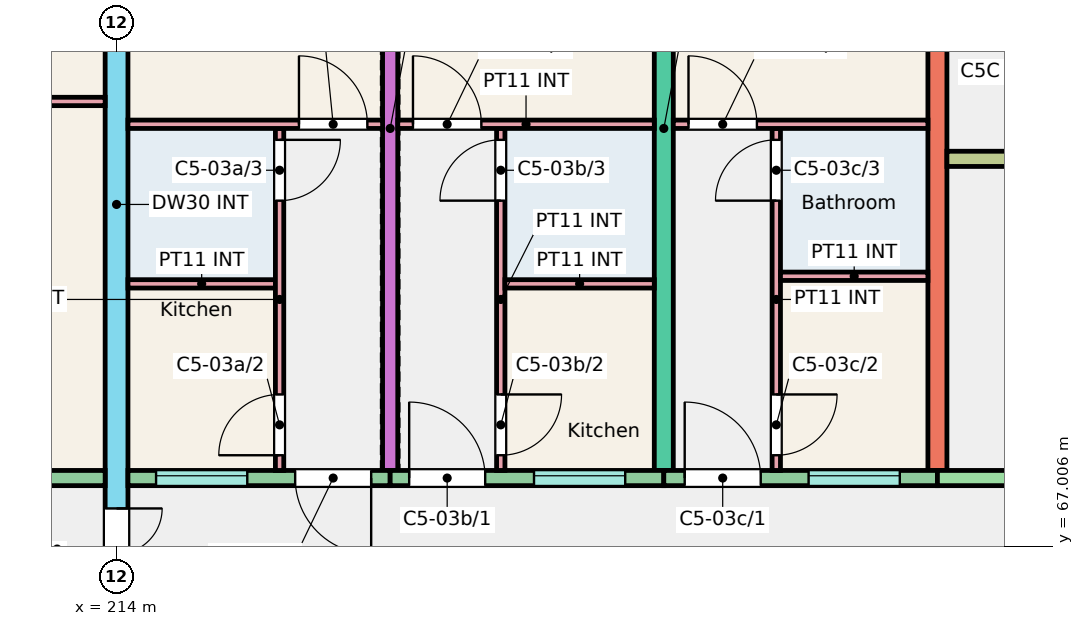
"""IFC4 building model, lengths in metres.
Left out: names, types, materials, properties, quantities, classifications, styles, units other than length and angle.
Written with IfcOpenShell. Run it as: python <this file> out.ifc"""

import sys

from ifc_helpers import new_model, si_unit, direction, frame, frame_2d, origin, place, context, subcontext, project, spatial, rectangle, extrude, element, fill, save


model = new_model("IFC4")
c1 = context("Model", 3, precision=1e-05, world=origin(), true_north=direction((0.0, 1.0)))
c2 = subcontext(c1, "Body", "Model", "MODEL_VIEW")
j1 = project(units=[si_unit("LENGTHUNIT", "METRE"), si_unit("PLANEANGLEUNIT", "RADIAN")], contexts=[c1])
p1 = place(None, origin())
s1 = spatial("IfcSite", under=j1, at=p1, CompositionType="ELEMENT")
p2 = place(p1, origin())
s2 = spatial("IfcBuilding", under=s1, at=p2, CompositionType="ELEMENT")
p3 = place(p2, frame((0.0, 0.0, 9.0)))
s3 = spatial("IfcBuildingStorey", under=s2, at=p3, CompositionType="ELEMENT", Elevation=9.0)
p4 = place(p3, frame((214.0, 66.0, 0.0), z_axis=(0.0, 0.0, 1.0), x_axis=(0.0, 1.0, 0.0)))
e1 = element("IfcWall", 1, at=p4, inside=s3, PredefinedType="SHEAR", context=c2, shape_type="SweptSolid", body=[
    extrude(rectangle(XDim=11.0, YDim=0.3, at=frame_2d((5.5, 0.0))), origin(), (0.0, 0.0, 1.0), 3.0),
])
p5 = place(p4, frame((0.3, 0.0, 0.0)))
e2 = element("IfcOpeningElement", 2, at=p5, cuts=e1, PredefinedType="OPENING", context=c2, shape_type="SweptSolid", body=[
    extrude(rectangle(XDim=1.2, YDim=2.1, at=frame_2d((0.6, 1.05))), frame((0.0, 0.16, 0.0), z_axis=(0.0, -1.0, 0.0), x_axis=(1.0, 0.0, 0.0)), (0.0, 0.0, 1.0), 0.32),
])
p6 = place(p3, frame((217.6, 68.0, 0.0), z_axis=(0.0, 0.0, 1.0), x_axis=(0.0, 1.0, 0.0)))
e3 = element("IfcWall", 3, at=p6, inside=s3, PredefinedType="SHEAR", context=c2, shape_type="SweptSolid", body=[
    extrude(rectangle(XDim=9.0, YDim=0.2, at=frame_2d((4.5, 0.0))), origin(), (0.0, 0.0, 1.0), 3.0),
])
for number, where, z_axis, x_axis in (
    (4, (221.2, 68.0, 0.0), (0.0, 0.0, 1.0), (0.0, 1.0, 0.0)),
    (5, (224.8, 68.0, 0.0), (0.0, 0.0, 1.0), (0.0, 1.0, 0.0)),
):
    element("IfcWall", number, at=place(p3, frame(where, z_axis=z_axis, x_axis=x_axis)), inside=s3, PredefinedType="SHEAR", context=c2, shape_type="SweptSolid", body=[
        extrude(rectangle(XDim=9.0, YDim=0.25, at=frame_2d((4.5, 0.0))), origin(), (0.0, 0.0, 1.0), 3.0),
    ])
p7 = place(p3, frame((210.4, 67.9, 0.0), z_axis=(0.0, 0.0, 1.0), x_axis=(1.0, 0.0, 0.0)))
e6 = element("IfcWall", 6, at=p7, inside=s3, PredefinedType="SOLIDWALL", context=c2, shape_type="SweptSolid", body=[
    extrude(rectangle(XDim=3.45, YDim=0.2, at=frame_2d((1.725, 0.0))), origin(), (0.0, 0.0, 1.0), 3.0),
])
p8 = place(p7, frame((1.025, 0.0, 0.9)))
e7 = element("IfcOpeningElement", 7, at=p8, cuts=e6, PredefinedType="OPENING", context=c2, shape_type="SweptSolid", body=[
    extrude(rectangle(XDim=1.5, YDim=1.5, at=frame_2d((0.75, 0.75))), frame((0.0, 0.11, 0.0), z_axis=(0.0, -1.0, 0.0), x_axis=(1.0, 0.0, 0.0)), (0.0, 0.0, 1.0), 0.22),
])
p9 = place(p3, frame((214.15, 67.9, 0.0), z_axis=(0.0, 0.0, 1.0), x_axis=(1.0, 0.0, 0.0)))
e8 = element("IfcWall", 8, at=p9, inside=s3, PredefinedType="SOLIDWALL", context=c2, shape_type="SweptSolid", body=[
    extrude(rectangle(XDim=3.45, YDim=0.2, at=frame_2d((1.725, 0.0))), origin(), (0.0, 0.0, 1.0), 3.0),
])
p10 = place(p9, frame((0.37, 0.0, 1.1)))
e9 = element("IfcOpeningElement", 9, at=p10, cuts=e8, PredefinedType="OPENING", context=c2, shape_type="SweptSolid", body=[
    extrude(rectangle(XDim=1.2, YDim=1.3, at=frame_2d((0.6, 0.65))), frame((0.0, 0.11, 0.0), z_axis=(0.0, -1.0, 0.0), x_axis=(1.0, 0.0, 0.0)), (0.0, 0.0, 1.0), 0.22),
])
p11 = place(p9, frame((2.2, 0.0, 0.0)))
e10 = element("IfcOpeningElement", 10, at=p11, cuts=e8, PredefinedType="OPENING", context=c2, shape_type="SweptSolid", body=[
    extrude(rectangle(XDim=1.0, YDim=2.1, at=frame_2d((0.5, 1.05))), frame((0.0, 0.11, 0.0), z_axis=(0.0, -1.0, 0.0), x_axis=(1.0, 0.0, 0.0)), (0.0, 0.0, 1.0), 0.22),
])
p12 = place(p3, frame((217.6, 67.9, 0.0), z_axis=(0.0, 0.0, 1.0), x_axis=(1.0, 0.0, 0.0)))
e11 = element("IfcWall", 11, at=p12, inside=s3, PredefinedType="SOLIDWALL", context=c2, shape_type="SweptSolid", body=[
    extrude(rectangle(XDim=3.6, YDim=0.2, at=frame_2d((1.8, 0.0))), origin(), (0.0, 0.0, 1.0), 3.0),
])
p13 = place(p12, frame((1.893, 0.0, 1.1)))
e12 = element("IfcOpeningElement", 12, at=p13, cuts=e11, PredefinedType="OPENING", context=c2, shape_type="SweptSolid", body=[
    extrude(rectangle(XDim=1.2, YDim=1.3, at=frame_2d((0.6, 0.65))), frame((0.0, 0.11, 0.0), z_axis=(0.0, -1.0, 0.0), x_axis=(1.0, 0.0, 0.0)), (0.0, 0.0, 1.0), 0.22),
])
p14 = place(p12, frame((0.25, 0.0, 0.0)))
e13 = element("IfcOpeningElement", 13, at=p14, cuts=e11, PredefinedType="OPENING", context=c2, shape_type="SweptSolid", body=[
    extrude(rectangle(XDim=1.0, YDim=2.1, at=frame_2d((0.5, 1.05))), frame((0.0, 0.11, 0.0), z_axis=(0.0, -1.0, 0.0), x_axis=(1.0, 0.0, 0.0)), (0.0, 0.0, 1.0), 0.22),
])
p15 = place(p3, frame((221.2, 67.9, 0.0), z_axis=(0.0, 0.0, 1.0), x_axis=(1.0, 0.0, 0.0)))
e14 = element("IfcWall", 14, at=p15, inside=s3, PredefinedType="SOLIDWALL", context=c2, shape_type="SweptSolid", body=[
    extrude(rectangle(XDim=3.6, YDim=0.2, at=frame_2d((1.8, 0.0))), origin(), (0.0, 0.0, 1.0), 3.0),
])
p16 = place(p15, frame((1.905, 0.0, 1.1)))
e15 = element("IfcOpeningElement", 15, at=p16, cuts=e14, PredefinedType="OPENING", context=c2, shape_type="SweptSolid", body=[
    extrude(rectangle(XDim=1.2, YDim=1.3, at=frame_2d((0.6, 0.65))), frame((0.0, 0.11, 0.0), z_axis=(0.0, -1.0, 0.0), x_axis=(1.0, 0.0, 0.0)), (0.0, 0.0, 1.0), 0.22),
])
p17 = place(p15, frame((0.275, 0.0, 0.0)))
e16 = element("IfcOpeningElement", 16, at=p17, cuts=e14, PredefinedType="OPENING", context=c2, shape_type="SweptSolid", body=[
    extrude(rectangle(XDim=1.0, YDim=2.1, at=frame_2d((0.5, 1.05))), frame((0.0, 0.11, 0.0), z_axis=(0.0, -1.0, 0.0), x_axis=(1.0, 0.0, 0.0)), (0.0, 0.0, 1.0), 0.22),
])
p18 = place(p3, frame((224.8, 67.9, 0.0), z_axis=(0.0, 0.0, 1.0), x_axis=(1.0, 0.0, 0.0)))
e17 = element("IfcWall", 17, at=p18, inside=s3, PredefinedType="SHEAR", context=c2, shape_type="SweptSolid", body=[
    extrude(rectangle(XDim=5.85, YDim=0.2, at=frame_2d((2.925, 0.0))), origin(), (0.0, 0.0, 1.0), 3.0),
])
p19 = place(p18, frame((2.438, 0.0, 0.0)))
e18 = element("IfcOpeningElement", 18, at=p19, cuts=e17, PredefinedType="OPENING", context=c2, shape_type="SweptSolid", body=[
    extrude(rectangle(XDim=1.1, YDim=2.1, at=frame_2d((0.55, 1.05))), frame((0.0, 0.11, 0.0), z_axis=(0.0, -1.0, 0.0), x_axis=(1.0, 0.0, 0.0)), (0.0, 0.0, 1.0), 0.22),
])
p20 = place(p3, frame((224.925, 72.1, 0.0), z_axis=(0.0, 0.0, 1.0), x_axis=(1.0, 0.0, 0.0)))
e19 = element("IfcWall", 19, at=p20, inside=s3, PredefinedType="SHEAR", context=c2, shape_type="SweptSolid", body=[
    extrude(rectangle(XDim=5.725, YDim=0.2, at=frame_2d((2.862, 0.0))), origin(), (0.0, 0.0, 1.0), 3.0),
])
p21 = place(p20, frame((0.95, 0.0, 0.0)))
e20 = element("IfcOpeningElement", 20, at=p21, cuts=e19, PredefinedType="OPENING", context=c2, shape_type="SweptSolid", body=[
    extrude(rectangle(XDim=1.0, YDim=2.1, at=frame_2d((0.5, 1.05))), frame((0.0, 0.11, 0.0), z_axis=(0.0, -1.0, 0.0), x_axis=(1.0, 0.0, 0.0)), (0.0, 0.0, 1.0), 0.22),
])
p22 = place(p20, frame((3.863, 0.0, 0.0)))
e21 = element("IfcOpeningElement", 21, at=p22, cuts=e19, PredefinedType="OPENING", context=c2, shape_type="SweptSolid", body=[
    extrude(rectangle(XDim=1.1, YDim=2.1, at=frame_2d((0.55, 1.05))), frame((0.0, 0.11, 0.0), z_axis=(0.0, -1.0, 0.0), x_axis=(1.0, 0.0, 0.0)), (0.0, 0.0, 1.0), 0.22),
])
p23 = place(p3, frame((210.5, 72.855, 0.0), z_axis=(0.0, 0.0, 1.0), x_axis=(1.0, 0.0, 0.0)))
e22 = element("IfcWall", 22, at=p23, inside=s3, PredefinedType="PARTITIONING", context=c2, shape_type="SweptSolid", body=[
    extrude(rectangle(XDim=3.35, YDim=0.11, at=frame_2d((1.675, 0.0))), origin(), (0.0, 0.0, 1.0), 2.8),
])
p24 = place(p3, frame((214.15, 70.455, 0.0), z_axis=(0.0, 0.0, 1.0), x_axis=(1.0, 0.0, 0.0)))
e23 = element("IfcWall", 23, at=p24, inside=s3, PredefinedType="PARTITIONING", context=c2, shape_type="SweptSolid", body=[
    extrude(rectangle(XDim=1.94, YDim=0.11, at=frame_2d((0.97, 0.0))), origin(), (0.0, 0.0, 1.0), 2.8),
])
p25 = place(p3, frame((216.145, 68.0, 0.0), z_axis=(0.0, 0.0, 1.0), x_axis=(0.0, 1.0, 0.0)))
e24 = element("IfcWall", 24, at=p25, inside=s3, PredefinedType="PARTITIONING", context=c2, shape_type="SweptSolid", body=[
    extrude(rectangle(XDim=4.5, YDim=0.11, at=frame_2d((2.25, 0.0))), origin(), (0.0, 0.0, 1.0), 2.8),
])
p26 = place(p25, frame((0.2, 0.0, 0.0)))
e25 = element("IfcOpeningElement", 25, at=p26, cuts=e24, PredefinedType="OPENING", context=c2, shape_type="SweptSolid", body=[
    extrude(rectangle(XDim=0.8, YDim=2.1, at=frame_2d((0.4, 1.05))), frame((0.0, 0.065, 0.0), z_axis=(0.0, -1.0, 0.0), x_axis=(1.0, 0.0, 0.0)), (0.0, 0.0, 1.0), 0.13),
])
p27 = place(p25, frame((3.55, 0.0, 0.0)))
e26 = element("IfcOpeningElement", 26, at=p27, cuts=e24, PredefinedType="OPENING", context=c2, shape_type="SweptSolid", body=[
    extrude(rectangle(XDim=0.8, YDim=2.1, at=frame_2d((0.4, 1.05))), frame((0.0, 0.065, 0.0), z_axis=(0.0, -1.0, 0.0), x_axis=(1.0, 0.0, 0.0)), (0.0, 0.0, 1.0), 0.13),
])
p28 = place(p3, frame((214.15, 72.555, 0.0), z_axis=(0.0, 0.0, 1.0), x_axis=(1.0, 0.0, 0.0)))
e27 = element("IfcWall", 27, at=p28, inside=s3, PredefinedType="PARTITIONING", context=c2, shape_type="SweptSolid", body=[
    extrude(rectangle(XDim=3.35, YDim=0.11, at=frame_2d((1.675, 0.0))), origin(), (0.0, 0.0, 1.0), 2.8),
])
p29 = place(p28, frame((2.25, 0.0, 0.0)))
e28 = element("IfcOpeningElement", 28, at=p29, cuts=e27, PredefinedType="OPENING", context=c2, shape_type="SweptSolid", body=[
    extrude(rectangle(XDim=0.9, YDim=2.1, at=frame_2d((0.45, 1.05))), frame((0.0, 0.065, 0.0), z_axis=(0.0, -1.0, 0.0), x_axis=(1.0, 0.0, 0.0)), (0.0, 0.0, 1.0), 0.13),
])
p30 = place(p3, frame((219.055, 68.0, 0.0), z_axis=(0.0, 0.0, 1.0), x_axis=(0.0, 1.0, 0.0)))
e29 = element("IfcWall", 29, at=p30, inside=s3, PredefinedType="PARTITIONING", context=c2, shape_type="SweptSolid", body=[
    extrude(rectangle(XDim=4.5, YDim=0.11, at=frame_2d((2.25, 0.0))), origin(), (0.0, 0.0, 1.0), 2.8),
])
p31 = place(p30, frame((0.2, 0.0, 0.0)))
e30 = element("IfcOpeningElement", 30, at=p31, cuts=e29, PredefinedType="OPENING", context=c2, shape_type="SweptSolid", body=[
    extrude(rectangle(XDim=0.8, YDim=2.1, at=frame_2d((0.4, 1.05))), frame((0.0, 0.065, 0.0), z_axis=(0.0, -1.0, 0.0), x_axis=(1.0, 0.0, 0.0)), (0.0, 0.0, 1.0), 0.13),
])
p32 = place(p30, frame((3.55, 0.0, 0.0)))
e31 = element("IfcOpeningElement", 31, at=p32, cuts=e29, PredefinedType="OPENING", context=c2, shape_type="SweptSolid", body=[
    extrude(rectangle(XDim=0.8, YDim=2.1, at=frame_2d((0.4, 1.05))), frame((0.0, 0.065, 0.0), z_axis=(0.0, -1.0, 0.0), x_axis=(1.0, 0.0, 0.0)), (0.0, 0.0, 1.0), 0.13),
])
p33 = place(p3, frame((219.11, 70.455, 0.0), z_axis=(0.0, 0.0, 1.0), x_axis=(1.0, 0.0, 0.0)))
e32 = element("IfcWall", 32, at=p33, inside=s3, PredefinedType="PARTITIONING", context=c2, shape_type="SweptSolid", body=[
    extrude(rectangle(XDim=1.965, YDim=0.11, at=frame_2d((0.982, 0.0))), origin(), (0.0, 0.0, 1.0), 2.8),
])
p34 = place(p3, frame((217.7, 72.555, 0.0), z_axis=(0.0, 0.0, 1.0), x_axis=(1.0, 0.0, 0.0)))
e33 = element("IfcWall", 33, at=p34, inside=s3, PredefinedType="PARTITIONING", context=c2, shape_type="SweptSolid", body=[
    extrude(rectangle(XDim=3.375, YDim=0.11, at=frame_2d((1.688, 0.0))), origin(), (0.0, 0.0, 1.0), 2.8),
])
p35 = place(p34, frame((0.2, 0.0, 0.0)))
e34 = element("IfcOpeningElement", 34, at=p35, cuts=e33, PredefinedType="OPENING", context=c2, shape_type="SweptSolid", body=[
    extrude(rectangle(XDim=0.9, YDim=2.1, at=frame_2d((0.45, 1.05))), frame((0.0, 0.065, 0.0), z_axis=(0.0, -1.0, 0.0), x_axis=(1.0, 0.0, 0.0)), (0.0, 0.0, 1.0), 0.13),
])
p36 = place(p3, frame((222.68, 68.0, 0.0), z_axis=(0.0, 0.0, 1.0), x_axis=(0.0, 1.0, 0.0)))
e35 = element("IfcWall", 35, at=p36, inside=s3, PredefinedType="PARTITIONING", context=c2, shape_type="SweptSolid", body=[
    extrude(rectangle(XDim=4.5, YDim=0.11, at=frame_2d((2.25, 0.0))), origin(), (0.0, 0.0, 1.0), 2.8),
])
p37 = place(p36, frame((0.2, 0.0, 0.0)))
e36 = element("IfcOpeningElement", 36, at=p37, cuts=e35, PredefinedType="OPENING", context=c2, shape_type="SweptSolid", body=[
    extrude(rectangle(XDim=0.8, YDim=2.1, at=frame_2d((0.4, 1.05))), frame((0.0, 0.065, 0.0), z_axis=(0.0, -1.0, 0.0), x_axis=(1.0, 0.0, 0.0)), (0.0, 0.0, 1.0), 0.13),
])
p38 = place(p36, frame((3.55, 0.0, 0.0)))
e37 = element("IfcOpeningElement", 37, at=p38, cuts=e35, PredefinedType="OPENING", context=c2, shape_type="SweptSolid", body=[
    extrude(rectangle(XDim=0.8, YDim=2.1, at=frame_2d((0.4, 1.05))), frame((0.0, 0.065, 0.0), z_axis=(0.0, -1.0, 0.0), x_axis=(1.0, 0.0, 0.0)), (0.0, 0.0, 1.0), 0.13),
])
p39 = place(p3, frame((222.735, 70.555, 0.0), z_axis=(0.0, 0.0, 1.0), x_axis=(1.0, 0.0, 0.0)))
e38 = element("IfcWall", 38, at=p39, inside=s3, PredefinedType="PARTITIONING", context=c2, shape_type="SweptSolid", body=[
    extrude(rectangle(XDim=1.94, YDim=0.11, at=frame_2d((0.97, 0.0))), origin(), (0.0, 0.0, 1.0), 2.8),
])
p40 = place(p3, frame((221.325, 72.555, 0.0), z_axis=(0.0, 0.0, 1.0), x_axis=(1.0, 0.0, 0.0)))
e39 = element("IfcWall", 39, at=p40, inside=s3, PredefinedType="PARTITIONING", context=c2, shape_type="SweptSolid", body=[
    extrude(rectangle(XDim=3.35, YDim=0.11, at=frame_2d((1.675, 0.0))), origin(), (0.0, 0.0, 1.0), 2.8),
])
p41 = place(p40, frame((0.2, 0.0, 0.0)))
e40 = element("IfcOpeningElement", 40, at=p41, cuts=e39, PredefinedType="OPENING", context=c2, shape_type="SweptSolid", body=[
    extrude(rectangle(XDim=0.9, YDim=2.1, at=frame_2d((0.45, 1.05))), frame((0.0, 0.065, 0.0), z_axis=(0.0, -1.0, 0.0), x_axis=(1.0, 0.0, 0.0)), (0.0, 0.0, 1.0), 0.13),
])
p42 = place(p10, origin())
e41 = element("IfcWindow", 41, at=p42, inside=s3, PartitioningType="SINGLE_PANEL", PredefinedType="WINDOW", context=c2, shape_type="SweptSolid", body=[
    extrude(rectangle(XDim=1.2, YDim=1.3, at=frame_2d((0.6, 0.65))), frame((0.0, 0.06, 0.0), z_axis=(0.0, -1.0, 0.0), x_axis=(1.0, 0.0, 0.0)), (0.0, 0.0, 1.0), 0.06),
])
fill(e9, e41)
p43 = place(p13, origin())
e42 = element("IfcWindow", 42, at=p43, inside=s3, PartitioningType="SINGLE_PANEL", PredefinedType="WINDOW", context=c2, shape_type="SweptSolid", body=[
    extrude(rectangle(XDim=1.2, YDim=1.3, at=frame_2d((0.6, 0.65))), frame((0.0, 0.06, 0.0), z_axis=(0.0, -1.0, 0.0), x_axis=(1.0, 0.0, 0.0)), (0.0, 0.0, 1.0), 0.06),
])
fill(e12, e42)
p44 = place(p16, origin())
e43 = element("IfcWindow", 43, at=p44, inside=s3, PartitioningType="SINGLE_PANEL", PredefinedType="WINDOW", context=c2, shape_type="SweptSolid", body=[
    extrude(rectangle(XDim=1.2, YDim=1.3, at=frame_2d((0.6, 0.65))), frame((0.0, 0.06, 0.0), z_axis=(0.0, -1.0, 0.0), x_axis=(1.0, 0.0, 0.0)), (0.0, 0.0, 1.0), 0.06),
])
fill(e15, e43)
p45 = place(p11, origin())
e44 = element("IfcDoor", 44, at=p45, inside=s3, OperationType="SINGLE_SWING_RIGHT", PredefinedType="DOOR", context=c2, shape_type="SweptSolid", body=[
    extrude(rectangle(XDim=1.0, YDim=2.1, at=frame_2d((0.5, 1.05))), frame((0.0, 0.025, 0.0), z_axis=(0.0, -1.0, 0.0), x_axis=(1.0, 0.0, 0.0)), (0.0, 0.0, 1.0), 0.05),
])
fill(e10, e44)
p46 = place(p26, origin())
e45 = element("IfcDoor", 45, at=p46, inside=s3, OperationType="SINGLE_SWING_LEFT", PredefinedType="DOOR", context=c2, shape_type="SweptSolid", body=[
    extrude(rectangle(XDim=0.8, YDim=2.1, at=frame_2d((0.4, 1.05))), frame((0.0, 0.025, 0.0), z_axis=(0.0, -1.0, 0.0), x_axis=(1.0, 0.0, 0.0)), (0.0, 0.0, 1.0), 0.05),
])
fill(e25, e45)
p47 = place(p27, origin())
e46 = element("IfcDoor", 46, at=p47, inside=s3, OperationType="SINGLE_SWING_RIGHT", PredefinedType="DOOR", context=c2, shape_type="SweptSolid", body=[
    extrude(rectangle(XDim=0.8, YDim=2.1, at=frame_2d((0.4, 1.05))), frame((0.0, 0.025, 0.0), z_axis=(0.0, -1.0, 0.0), x_axis=(1.0, 0.0, 0.0)), (0.0, 0.0, 1.0), 0.05),
])
fill(e26, e46)
p48 = place(p29, origin())
e47 = element("IfcDoor", 47, at=p48, inside=s3, OperationType="SINGLE_SWING_LEFT", PredefinedType="DOOR", context=c2, shape_type="SweptSolid", body=[
    extrude(rectangle(XDim=0.9, YDim=2.1, at=frame_2d((0.45, 1.05))), frame((0.0, 0.025, 0.0), z_axis=(0.0, -1.0, 0.0), x_axis=(1.0, 0.0, 0.0)), (0.0, 0.0, 1.0), 0.05),
])
fill(e28, e47)
p49 = place(p14, origin())
e48 = element("IfcDoor", 48, at=p49, inside=s3, OperationType="SINGLE_SWING_LEFT", PredefinedType="DOOR", context=c2, shape_type="SweptSolid", body=[
    extrude(rectangle(XDim=1.0, YDim=2.1, at=frame_2d((0.5, 1.05))), frame((0.0, 0.025, 0.0), z_axis=(0.0, -1.0, 0.0), x_axis=(1.0, 0.0, 0.0)), (0.0, 0.0, 1.0), 0.05),
])
fill(e13, e48)
p50 = place(p31, origin())
e49 = element("IfcDoor", 49, at=p50, inside=s3, OperationType="SINGLE_SWING_RIGHT", PredefinedType="DOOR", context=c2, shape_type="SweptSolid", body=[
    extrude(rectangle(XDim=0.8, YDim=2.1, at=frame_2d((0.4, 1.05))), frame((0.0, 0.025, 0.0), z_axis=(0.0, -1.0, 0.0), x_axis=(1.0, 0.0, 0.0)), (0.0, 0.0, 1.0), 0.05),
])
fill(e30, e49)
p51 = place(p32, origin())
e50 = element("IfcDoor", 50, at=p51, inside=s3, OperationType="SINGLE_SWING_LEFT", PredefinedType="DOOR", context=c2, shape_type="SweptSolid", body=[
    extrude(rectangle(XDim=0.8, YDim=2.1, at=frame_2d((0.4, 1.05))), frame((0.0, 0.025, 0.0), z_axis=(0.0, -1.0, 0.0), x_axis=(1.0, 0.0, 0.0)), (0.0, 0.0, 1.0), 0.05),
])
fill(e31, e50)
p52 = place(p35, origin())
e51 = element("IfcDoor", 51, at=p52, inside=s3, OperationType="SINGLE_SWING_LEFT", PredefinedType="DOOR", context=c2, shape_type="SweptSolid", body=[
    extrude(rectangle(XDim=0.9, YDim=2.1, at=frame_2d((0.45, 1.05))), frame((0.0, 0.025, 0.0), z_axis=(0.0, -1.0, 0.0), x_axis=(1.0, 0.0, 0.0)), (0.0, 0.0, 1.0), 0.05),
])
fill(e34, e51)
p53 = place(p17, origin())
e52 = element("IfcDoor", 52, at=p53, inside=s3, OperationType="SINGLE_SWING_LEFT", PredefinedType="DOOR", context=c2, shape_type="SweptSolid", body=[
    extrude(rectangle(XDim=1.0, YDim=2.1, at=frame_2d((0.5, 1.05))), frame((0.0, 0.025, 0.0), z_axis=(0.0, -1.0, 0.0), x_axis=(1.0, 0.0, 0.0)), (0.0, 0.0, 1.0), 0.05),
])
fill(e16, e52)
p54 = place(p37, origin())
e53 = element("IfcDoor", 53, at=p54, inside=s3, OperationType="SINGLE_SWING_RIGHT", PredefinedType="DOOR", context=c2, shape_type="SweptSolid", body=[
    extrude(rectangle(XDim=0.8, YDim=2.1, at=frame_2d((0.4, 1.05))), frame((0.0, 0.025, 0.0), z_axis=(0.0, -1.0, 0.0), x_axis=(1.0, 0.0, 0.0)), (0.0, 0.0, 1.0), 0.05),
])
fill(e36, e53)
p55 = place(p38, origin())
e54 = element("IfcDoor", 54, at=p55, inside=s3, OperationType="SINGLE_SWING_LEFT", PredefinedType="DOOR", context=c2, shape_type="SweptSolid", body=[
    extrude(rectangle(XDim=0.8, YDim=2.1, at=frame_2d((0.4, 1.05))), frame((0.0, 0.025, 0.0), z_axis=(0.0, -1.0, 0.0), x_axis=(1.0, 0.0, 0.0)), (0.0, 0.0, 1.0), 0.05),
])
fill(e37, e54)
p56 = place(p41, origin())
e55 = element("IfcDoor", 55, at=p56, inside=s3, OperationType="SINGLE_SWING_LEFT", PredefinedType="DOOR", context=c2, shape_type="SweptSolid", body=[
    extrude(rectangle(XDim=0.9, YDim=2.1, at=frame_2d((0.45, 1.05))), frame((0.0, 0.025, 0.0), z_axis=(0.0, -1.0, 0.0), x_axis=(1.0, 0.0, 0.0)), (0.0, 0.0, 1.0), 0.05),
])
fill(e40, e55)
p57 = place(p5, origin())
e56 = element("IfcDoor", 56, at=p57, inside=s3, OperationType="DOUBLE_DOOR_SINGLE_SWING", PredefinedType="DOOR", context=c2, shape_type="SweptSolid", body=[
    extrude(rectangle(XDim=1.2, YDim=2.1, at=frame_2d((0.6, 1.05))), frame((0.0, 0.025, 0.0), z_axis=(0.0, -1.0, 0.0), x_axis=(1.0, 0.0, 0.0)), (0.0, 0.0, 1.0), 0.05),
])
fill(e2, e56)
save(model, sys.argv[1])
